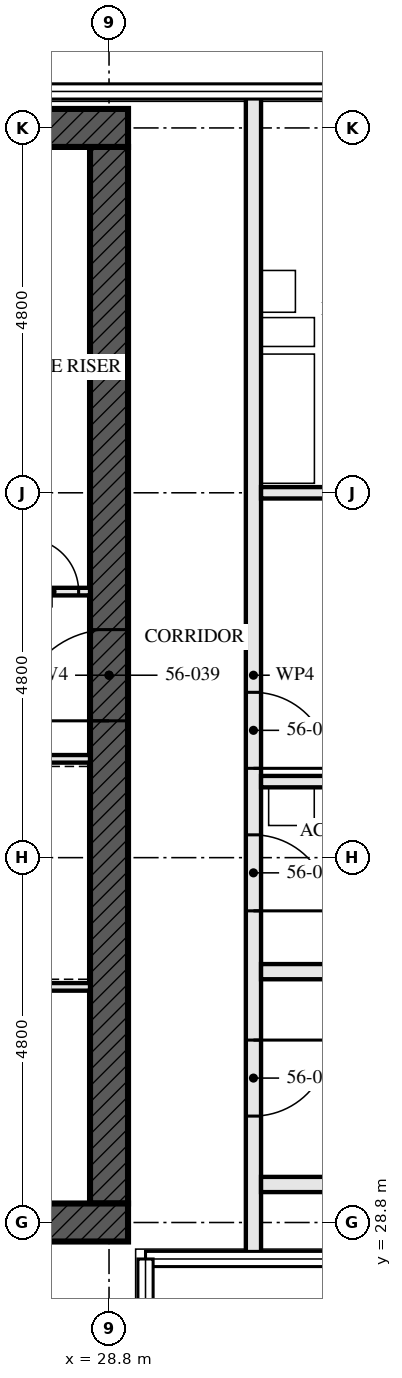
"""IFC4 building model, lengths in metres.
Left out: names, types, materials, properties, quantities, classifications, styles, units other than length and angle.
Written with IfcOpenShell. Run it as: python <this file> out.ifc"""

import sys

from ifc_helpers import new_model, si_unit, direction, frame, frame_2d, origin, place, context, subcontext, project, spatial, rectangle, extrude, element, fill, save


model = new_model("IFC4")
c1 = context("Model", 3, precision=1e-05, world=origin(), true_north=direction((0.0, 1.0)))
c2 = subcontext(c1, "Body", "Model", "MODEL_VIEW")
j1 = project(units=[si_unit("LENGTHUNIT", "METRE"), si_unit("PLANEANGLEUNIT", "RADIAN")], contexts=[c1])
p1 = place(None, origin())
s1 = spatial("IfcSite", under=j1, at=p1, CompositionType="ELEMENT")
p2 = place(p1, origin())
s2 = spatial("IfcBuilding", under=s1, at=p2, CompositionType="ELEMENT")
p3 = place(p2, frame((0.0, 0.0, 205.0)))
s3 = spatial("IfcBuildingStorey", under=s2, at=p3, CompositionType="ELEMENT", Elevation=205.0)
p4 = place(p3, frame((14.15, 28.8, -0.17), z_axis=(0.0, 0.0, 1.0), x_axis=(1.0, 0.0, 0.0)))
e1 = element("IfcWall", 1, at=p4, inside=s3, PredefinedType="SHEAR", context=c2, shape_type="SweptSolid", body=[
    extrude(rectangle(XDim=14.9, YDim=0.5, at=frame_2d((7.45, 0.0))), origin(), (0.0, 0.0, 1.0), 3.5),
])
p5 = place(p4, frame((6.85, 0.0, 0.17)))
e2 = element("IfcOpeningElement", 2, at=p5, cuts=e1, PredefinedType="OPENING", context=c2, shape_type="SweptSolid", body=[
    extrude(rectangle(XDim=1.2, YDim=2.1, at=frame_2d((0.6, 1.05))), frame((0.0, 0.26, 0.0), z_axis=(0.0, -1.0, 0.0), x_axis=(1.0, 0.0, 0.0)), (0.0, 0.0, 1.0), 0.521),
])
p6 = place(p3, frame((29.05, 43.2, -0.17), z_axis=(0.0, 0.0, 1.0), x_axis=(-1.0, 0.0, 0.0)))
e3 = element("IfcWall", 3, at=p6, inside=s3, PredefinedType="SHEAR", context=c2, shape_type="SweptSolid", body=[
    extrude(rectangle(XDim=14.9, YDim=0.5, at=frame_2d((7.45, 0.0))), origin(), (0.0, 0.0, 1.0), 3.5),
])
p7 = place(p3, frame((28.8, 29.05, -0.17), z_axis=(0.0, 0.0, 1.0), x_axis=(0.0, 1.0, 0.0)))
e4 = element("IfcWall", 4, at=p7, inside=s3, PredefinedType="SHEAR", context=c2, shape_type="SweptSolid", body=[
    extrude(rectangle(XDim=13.9, YDim=0.5, at=frame_2d((6.95, 0.0))), origin(), (0.0, 0.0, 1.0), 3.5),
])
p8 = place(p7, frame((6.35, 0.0, 0.17)))
e5 = element("IfcOpeningElement", 5, at=p8, cuts=e4, PredefinedType="OPENING", context=c2, shape_type="SweptSolid", body=[
    extrude(rectangle(XDim=1.2, YDim=2.1, at=frame_2d((0.6, 1.05))), frame((0.0, 0.26, 0.0), z_axis=(0.0, -1.0, 0.0), x_axis=(1.0, 0.0, 0.0)), (0.0, 0.0, 1.0), 0.521),
])
for number, where, z_axis, x_axis in (
    (6, (35.5, 29.3, 0.0), (0.0, 0.0, 1.0), (-1.0, 0.0, 0.0)),
    (7, (35.5, 32.1, 0.0), (0.0, 0.0, 1.0), (-1.0, 0.0, 0.0)),
):
    element("IfcWall", number, at=place(p3, frame(where, z_axis=z_axis, x_axis=x_axis)), inside=s3, PredefinedType="SOLIDWALL", context=c2, shape_type="SweptSolid", body=[
        extrude(rectangle(XDim=4.7, YDim=0.2, at=frame_2d((2.35, 0.0))), origin(), (0.0, 0.0, 1.0), 2.99),
    ])
p9 = place(p3, frame((33.8, 34.6, 0.0), z_axis=(0.0, 0.0, 1.0), x_axis=(-1.0, 0.0, 0.0)))
e8 = element("IfcWall", 8, at=p9, inside=s3, PredefinedType="PARTITIONING", context=c2, shape_type="SweptSolid", body=[
    extrude(rectangle(XDim=3.0, YDim=0.15, at=frame_2d((1.5, 0.0))), origin(), (0.0, 0.0, 1.0), 3.33),
])
p10 = place(p3, frame((33.8, 38.4, 0.0), z_axis=(0.0, 0.0, 1.0), x_axis=(-1.0, 0.0, 0.0)))
e9 = element("IfcWall", 9, at=p10, inside=s3, PredefinedType="PARTITIONING", context=c2, shape_type="SweptSolid", body=[
    extrude(rectangle(XDim=3.0, YDim=0.15, at=frame_2d((1.5, 0.0))), origin(), (0.0, 0.0, 1.0), 2.55),
])
p11 = place(p10, frame((1.05, 0.0, 0.0)))
e10 = element("IfcOpeningElement", 10, at=p11, cuts=e9, PredefinedType="OPENING", context=c2, shape_type="SweptSolid", body=[
    extrude(rectangle(XDim=0.9, YDim=2.1, at=frame_2d((0.45, 1.05))), frame((0.0, 0.085, 0.0), z_axis=(0.0, -1.0, 0.0), x_axis=(1.0, 0.0, 0.0)), (0.0, 0.0, 1.0), 0.171),
])
p12 = place(p3, frame((30.7, 28.345, 0.0), z_axis=(0.0, 0.0, 1.0), x_axis=(0.0, 1.0, 0.0)))
e11 = element("IfcWall", 11, at=p12, inside=s3, PredefinedType="PARTITIONING", context=c2, shape_type="SweptSolid", body=[
    extrude(rectangle(XDim=15.31, YDim=0.2, at=frame_2d((7.655, 0.0))), origin(), (0.0, 0.0, 1.0), 2.32),
])
p13 = place(p12, frame((1.855, 0.0, 0.0)))
e12 = element("IfcOpeningElement", 12, at=p13, cuts=e11, PredefinedType="OPENING", context=c2, shape_type="SweptSolid", body=[
    extrude(rectangle(XDim=1.0, YDim=2.1, at=frame_2d((0.5, 1.05))), frame((0.0, 0.111, 0.0), z_axis=(0.0, -1.0, 0.0), x_axis=(1.0, 0.0, 0.0)), (0.0, 0.0, 1.0), 0.221),
])
p14 = place(p12, frame((4.555, 0.0, 0.0)))
e13 = element("IfcOpeningElement", 13, at=p14, cuts=e11, PredefinedType="OPENING", context=c2, shape_type="SweptSolid", body=[
    extrude(rectangle(XDim=1.0, YDim=2.1, at=frame_2d((0.5, 1.05))), frame((0.0, 0.111, 0.0), z_axis=(0.0, -1.0, 0.0), x_axis=(1.0, 0.0, 0.0)), (0.0, 0.0, 1.0), 0.221),
])
p15 = place(p12, frame((6.43, 0.0, 0.0)))
e14 = element("IfcOpeningElement", 14, at=p15, cuts=e11, PredefinedType="OPENING", context=c2, shape_type="SweptSolid", body=[
    extrude(rectangle(XDim=1.0, YDim=2.1, at=frame_2d((0.5, 1.05))), frame((0.0, 0.111, 0.0), z_axis=(0.0, -1.0, 0.0), x_axis=(1.0, 0.0, 0.0)), (0.0, 0.0, 1.0), 0.221),
])
p16 = place(p3, frame((23.05, 34.9, 0.0), z_axis=(0.0, 0.0, 1.0), x_axis=(1.0, 0.0, 0.0)))
e15 = element("IfcWall", 15, at=p16, inside=s3, PredefinedType="SOLIDWALL", context=c2, shape_type="SweptSolid", body=[
    extrude(rectangle(XDim=5.5, YDim=0.1, at=frame_2d((2.75, 0.0))), origin(), (0.0, 0.0, 1.0), 3.33),
])
p17 = place(p16, frame((0.85, 0.0, 0.0)))
e16 = element("IfcOpeningElement", 16, at=p17, cuts=e15, PredefinedType="OPENING", context=c2, shape_type="SweptSolid", body=[
    extrude(rectangle(XDim=1.0, YDim=2.1, at=frame_2d((0.5, 1.05))), frame((0.0, 0.061, 0.0), z_axis=(0.0, -1.0, 0.0), x_axis=(1.0, 0.0, 0.0)), (0.0, 0.0, 1.0), 0.121),
])
p18 = place(p16, frame((3.625, 0.0, 0.0)))
e17 = element("IfcOpeningElement", 17, at=p18, cuts=e15, PredefinedType="OPENING", context=c2, shape_type="SweptSolid", body=[
    extrude(rectangle(XDim=1.0, YDim=2.1, at=frame_2d((0.5, 1.05))), frame((0.0, 0.061, 0.0), z_axis=(0.0, -1.0, 0.0), x_axis=(1.0, 0.0, 0.0)), (0.0, 0.0, 1.0), 0.121),
])
p19 = place(p3, frame((22.65, 37.1, 0.0), z_axis=(0.0, 0.0, 1.0), x_axis=(1.0, 0.0, 0.0)))
e18 = element("IfcWall", 18, at=p19, inside=s3, PredefinedType="SOLIDWALL", context=c2, shape_type="SweptSolid", body=[
    extrude(rectangle(XDim=5.9, YDim=0.1, at=frame_2d((2.95, 0.0))), origin(), (0.0, 0.0, 1.0), 3.33),
])
p20 = place(p19, frame((3.5, 0.0, 0.0)))
e19 = element("IfcOpeningElement", 19, at=p20, cuts=e18, PredefinedType="OPENING", context=c2, shape_type="SweptSolid", body=[
    extrude(rectangle(XDim=0.9, YDim=2.1, at=frame_2d((0.45, 1.05))), frame((0.0, 0.061, 0.0), z_axis=(0.0, -1.0, 0.0), x_axis=(1.0, 0.0, 0.0)), (0.0, 0.0, 1.0), 0.121),
])
p21 = place(p19, frame((5.05, 0.0, 0.0)))
e20 = element("IfcOpeningElement", 20, at=p21, cuts=e18, PredefinedType="OPENING", context=c2, shape_type="SweptSolid", body=[
    extrude(rectangle(XDim=0.7, YDim=2.1, at=frame_2d((0.35, 1.05))), frame((0.0, 0.061, 0.0), z_axis=(0.0, -1.0, 0.0), x_axis=(1.0, 0.0, 0.0)), (0.0, 0.0, 1.0), 0.121),
])
p22 = place(p3, frame((23.15, 31.9, 0.0), z_axis=(0.0, 0.0, 1.0), x_axis=(1.0, 0.0, 0.0)))
e21 = element("IfcWall", 21, at=p22, inside=s3, PredefinedType="SOLIDWALL", context=c2, shape_type="SweptSolid", body=[
    extrude(rectangle(XDim=5.4, YDim=0.1, at=frame_2d((2.7, 0.0))), origin(), (0.0, 0.0, 1.0), 3.33),
])
p23 = place(p13, frame((1.0, 0.0, 0.0), z_axis=(0.0, 0.0, 1.0), x_axis=(-1.0, 0.0, 0.0)))
e22 = element("IfcDoor", 22, at=p23, inside=s3, OperationType="SINGLE_SWING_RIGHT", PredefinedType="DOOR", context=c2, shape_type="SweptSolid", body=[
    extrude(rectangle(XDim=1.0, YDim=2.1, at=frame_2d((0.5, 1.05))), frame((0.0, 0.032, 0.0), z_axis=(0.0, -1.0, 0.0), x_axis=(1.0, 0.0, 0.0)), (0.0, 0.0, 1.0), 0.064),
])
fill(e12, e22)
p24 = place(p14, frame((1.0, 0.0, 0.0), z_axis=(0.0, 0.0, 1.0), x_axis=(-1.0, 0.0, 0.0)))
e23 = element("IfcDoor", 23, at=p24, inside=s3, OperationType="SINGLE_SWING_LEFT", PredefinedType="DOOR", context=c2, shape_type="SweptSolid", body=[
    extrude(rectangle(XDim=1.0, YDim=2.1, at=frame_2d((0.5, 1.05))), frame((0.0, 0.027, 0.0), z_axis=(0.0, -1.0, 0.0), x_axis=(1.0, 0.0, 0.0)), (0.0, 0.0, 1.0), 0.054),
])
fill(e13, e23)
p25 = place(p15, frame((1.0, 0.0, 0.0), z_axis=(0.0, 0.0, 1.0), x_axis=(-1.0, 0.0, 0.0)))
e24 = element("IfcDoor", 24, at=p25, inside=s3, OperationType="SINGLE_SWING_LEFT", PredefinedType="DOOR", context=c2, shape_type="SweptSolid", body=[
    extrude(rectangle(XDim=1.0, YDim=2.1, at=frame_2d((0.5, 1.05))), frame((0.0, 0.027, 0.0), z_axis=(0.0, -1.0, 0.0), x_axis=(1.0, 0.0, 0.0)), (0.0, 0.0, 1.0), 0.054),
])
fill(e14, e24)
p26 = place(p21, origin())
e25 = element("IfcDoor", 25, at=p26, inside=s3, OperationType="SINGLE_SWING_RIGHT", PredefinedType="DOOR", context=c2, shape_type="SweptSolid", body=[
    extrude(rectangle(XDim=0.7, YDim=2.1, at=frame_2d((0.35, 1.05))), frame((0.0, 0.027, 0.0), z_axis=(0.0, -1.0, 0.0), x_axis=(1.0, 0.0, 0.0)), (0.0, 0.0, 1.0), 0.054),
])
fill(e20, e25)
p27 = place(p8, origin())
e26 = element("IfcDoor", 26, at=p27, inside=s3, OperationType="SINGLE_SWING_LEFT", PredefinedType="DOOR", context=c2, shape_type="SweptSolid", body=[
    extrude(rectangle(XDim=1.2, YDim=2.1, at=frame_2d((0.6, 1.05))), frame((0.0, 0.027, 0.0), z_axis=(0.0, -1.0, 0.0), x_axis=(1.0, 0.0, 0.0)), (0.0, 0.0, 1.0), 0.054),
])
fill(e5, e26)
save(model, sys.argv[1])
